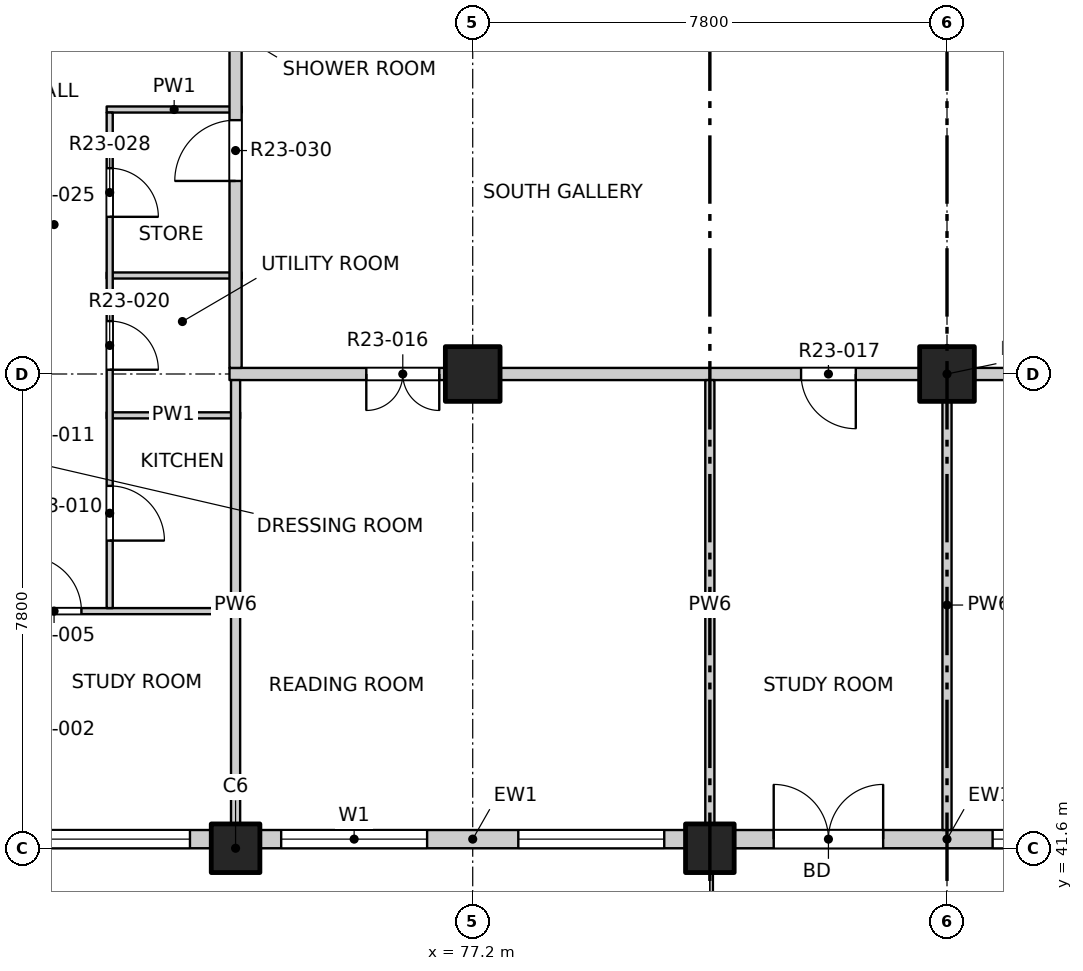
"""IFC4 building model, lengths in metres.
Left out: names, types, materials, properties, quantities, classifications, styles, units other than length and angle.
Written with IfcOpenShell. Run it as: python <this file> out.ifc"""

import sys

from ifc_helpers import new_model, si_unit, direction, frame, frame_2d, origin, origin_2d, place, context, subcontext, project, spatial, rectangle, extrude, element, fill, save


model = new_model("IFC4")
c1 = context("Model", 3, precision=1e-05, world=origin(), true_north=direction((0.0, 1.0)))
c2 = subcontext(c1, "Body", "Model", "MODEL_VIEW")
j1 = project(units=[si_unit("LENGTHUNIT", "METRE"), si_unit("PLANEANGLEUNIT", "RADIAN")], contexts=[c1])
p1 = place(None, origin())
s1 = spatial("IfcSite", under=j1, at=p1, CompositionType="ELEMENT")
p2 = place(p1, origin())
s2 = spatial("IfcBuilding", under=s1, at=p2, CompositionType="ELEMENT")
p3 = place(p2, frame((0.0, 0.0, 234.7)))
s3 = spatial("IfcBuildingStorey", under=s2, at=p3, CompositionType="ELEMENT", Elevation=234.7)
for number, where, z_axis, x_axis in (
    (1, (73.3, 41.6, -0.25), (0.0, 0.0, 1.0), (1.0, 0.0, 0.0)),
    (2, (81.1, 41.6, -0.25), (0.0, 0.0, 1.0), (1.0, 0.0, 0.0)),
):
    element("IfcColumn", number, at=place(p3, frame(where, z_axis=z_axis, x_axis=x_axis)), inside=s3, PredefinedType="COLUMN", context=c2, shape_type="SweptSolid", body=[
        extrude(rectangle(XDim=0.8, YDim=0.8, at=origin_2d()), origin(), (0.0, 0.0, 1.0), 3.4),
    ])
for number, where, z_axis, x_axis in (
    (3, (77.2, 49.4, -0.25), (0.0, 0.0, 1.0), (1.0, 0.0, 0.0)),
    (4, (85.0, 49.4, -0.25), (0.0, 0.0, 1.0), (1.0, 0.0, 0.0)),
):
    element("IfcColumn", number, at=place(p3, frame(where, z_axis=z_axis, x_axis=x_axis)), inside=s3, PredefinedType="COLUMN", context=c2, shape_type="SweptSolid", body=[
        extrude(rectangle(XDim=0.9, YDim=0.9, at=origin_2d()), origin(), (0.0, 0.0, 1.0), 3.4),
    ])
p4 = place(p3, frame((65.5, 41.75, 0.0), z_axis=(0.0, 0.0, 1.0), x_axis=(1.0, 0.0, 0.0)))
e5 = element("IfcWall", 5, at=p4, inside=s3, PredefinedType="SOLIDWALL", context=c2, shape_type="SweptSolid", body=[
    extrude(rectangle(XDim=7.4, YDim=0.3, at=frame_2d((3.7, 0.0))), origin(), (0.0, 0.0, 1.0), 2.7),
])
p5 = place(p4, frame((0.75, 0.0, 0.9)))
e6 = element("IfcOpeningElement", 6, at=p5, cuts=e5, PredefinedType="OPENING", context=c2, shape_type="SweptSolid", body=[
    extrude(rectangle(XDim=2.4, YDim=1.8, at=frame_2d((1.2, 0.9))), frame((0.0, 0.16, 0.0), z_axis=(0.0, -1.0, 0.0), x_axis=(1.0, 0.0, 0.0)), (0.0, 0.0, 1.0), 0.32),
])
p6 = place(p4, frame((4.65, 0.0, 0.9)))
e7 = element("IfcOpeningElement", 7, at=p6, cuts=e5, PredefinedType="OPENING", context=c2, shape_type="SweptSolid", body=[
    extrude(rectangle(XDim=2.4, YDim=1.8, at=frame_2d((1.2, 0.9))), frame((0.0, 0.16, 0.0), z_axis=(0.0, -1.0, 0.0), x_axis=(1.0, 0.0, 0.0)), (0.0, 0.0, 1.0), 0.32),
])
p7 = place(p3, frame((73.7, 41.75, 0.0), z_axis=(0.0, 0.0, 1.0), x_axis=(1.0, 0.0, 0.0)))
e8 = element("IfcWall", 8, at=p7, inside=s3, PredefinedType="SOLIDWALL", context=c2, shape_type="SweptSolid", body=[
    extrude(rectangle(XDim=7.0, YDim=0.3, at=frame_2d((3.5, 0.0))), origin(), (0.0, 0.0, 1.0), 2.7),
])
p8 = place(p7, frame((0.35, 0.0, 0.9)))
e9 = element("IfcOpeningElement", 9, at=p8, cuts=e8, PredefinedType="OPENING", context=c2, shape_type="SweptSolid", body=[
    extrude(rectangle(XDim=2.4, YDim=1.8, at=frame_2d((1.2, 0.9))), frame((0.0, 0.16, 0.0), z_axis=(0.0, -1.0, 0.0), x_axis=(1.0, 0.0, 0.0)), (0.0, 0.0, 1.0), 0.32),
])
p9 = place(p7, frame((4.25, 0.0, 0.9)))
e10 = element("IfcOpeningElement", 10, at=p9, cuts=e8, PredefinedType="OPENING", context=c2, shape_type="SweptSolid", body=[
    extrude(rectangle(XDim=2.4, YDim=1.8, at=frame_2d((1.2, 0.9))), frame((0.0, 0.16, 0.0), z_axis=(0.0, -1.0, 0.0), x_axis=(1.0, 0.0, 0.0)), (0.0, 0.0, 1.0), 0.32),
])
p10 = place(p3, frame((81.5, 41.75, 0.0), z_axis=(0.0, 0.0, 1.0), x_axis=(1.0, 0.0, 0.0)))
e11 = element("IfcWall", 11, at=p10, inside=s3, PredefinedType="SOLIDWALL", context=c2, shape_type="SweptSolid", body=[
    extrude(rectangle(XDim=7.0, YDim=0.3, at=frame_2d((3.5, 0.0))), origin(), (0.0, 0.0, 1.0), 2.7),
])
p11 = place(p10, frame((0.65, 0.0, 0.0)))
e12 = element("IfcOpeningElement", 12, at=p11, cuts=e11, PredefinedType="OPENING", context=c2, shape_type="SweptSolid", body=[
    extrude(rectangle(XDim=1.8, YDim=2.4, at=frame_2d((0.9, 1.2))), frame((0.0, 0.16, 0.0), z_axis=(0.0, -1.0, 0.0), x_axis=(1.0, 0.0, 0.0)), (0.0, 0.0, 1.0), 0.32),
])
p12 = place(p10, frame((4.25, 0.0, 0.9)))
e13 = element("IfcOpeningElement", 13, at=p12, cuts=e11, PredefinedType="OPENING", context=c2, shape_type="SweptSolid", body=[
    extrude(rectangle(XDim=2.4, YDim=1.8, at=frame_2d((1.2, 0.9))), frame((0.0, 0.16, 0.0), z_axis=(0.0, -1.0, 0.0), x_axis=(1.0, 0.0, 0.0)), (0.0, 0.0, 1.0), 0.32),
])
p13 = place(p3, frame((61.9, 45.5, 0.0), z_axis=(0.0, 0.0, 1.0), x_axis=(1.0, 0.0, 0.0)))
e14 = element("IfcWall", 14, at=p13, inside=s3, PredefinedType="PARTITIONING", context=c2, shape_type="SweptSolid", body=[
    extrude(rectangle(XDim=11.475, YDim=0.1, at=frame_2d((5.737, 0.0))), origin(), (0.0, 0.0, 1.0), 3.15),
])
p14 = place(p13, frame((7.965, 0.0, 0.0)))
e15 = element("IfcOpeningElement", 15, at=p14, cuts=e14, PredefinedType="OPENING", context=c2, shape_type="SweptSolid", body=[
    extrude(rectangle(XDim=0.9, YDim=2.1, at=frame_2d((0.45, 1.05))), frame((0.0, 0.06, 0.0), z_axis=(0.0, -1.0, 0.0), x_axis=(1.0, 0.0, 0.0)), (0.0, 0.0, 1.0), 0.12),
])
p15 = place(p3, frame((71.18, 48.72, 0.0), z_axis=(0.0, 0.0, 1.0), x_axis=(1.0, 0.0, 0.0)))
e16 = element("IfcWall", 16, at=p15, inside=s3, PredefinedType="PARTITIONING", context=c2, shape_type="SweptSolid", body=[
    extrude(rectangle(XDim=2.195, YDim=0.1, at=frame_2d((1.097, 0.0))), origin(), (0.0, 0.0, 1.0), 3.15),
])
p16 = place(p3, frame((73.2, 49.4, 0.0), z_axis=(0.0, 0.0, 1.0), x_axis=(1.0, 0.0, 0.0)))
e17 = element("IfcWall", 17, at=p16, inside=s3, PredefinedType="PARTITIONING", context=c2, shape_type="SweptSolid", body=[
    extrude(rectangle(XDim=23.6, YDim=0.2, at=frame_2d((11.8, 0.0))), origin(), (0.0, 0.0, 1.0), 3.15),
])
p17 = place(p16, frame((2.25, 0.0, 0.0)))
e18 = element("IfcOpeningElement", 18, at=p17, cuts=e17, PredefinedType="OPENING", context=c2, shape_type="SweptSolid", body=[
    extrude(rectangle(XDim=1.2, YDim=2.1, at=frame_2d((0.6, 1.05))), frame((0.0, 0.11, 0.0), z_axis=(0.0, -1.0, 0.0), x_axis=(1.0, 0.0, 0.0)), (0.0, 0.0, 1.0), 0.22),
])
p18 = place(p16, frame((9.4, 0.0, 0.0)))
e19 = element("IfcOpeningElement", 19, at=p18, cuts=e17, PredefinedType="OPENING", context=c2, shape_type="SweptSolid", body=[
    extrude(rectangle(XDim=0.9, YDim=2.1, at=frame_2d((0.45, 1.05))), frame((0.0, 0.11, 0.0), z_axis=(0.0, -1.0, 0.0), x_axis=(1.0, 0.0, 0.0)), (0.0, 0.0, 1.0), 0.22),
])
p19 = place(p16, frame((15.1, 0.0, 0.0)))
e20 = element("IfcOpeningElement", 20, at=p19, cuts=e17, PredefinedType="OPENING", context=c2, shape_type="SweptSolid", body=[
    extrude(rectangle(XDim=1.2, YDim=2.1, at=frame_2d((0.6, 1.05))), frame((0.0, 0.11, 0.0), z_axis=(0.0, -1.0, 0.0), x_axis=(1.0, 0.0, 0.0)), (0.0, 0.0, 1.0), 0.22),
])
p20 = place(p16, frame((21.1, 0.0, 0.0)))
e21 = element("IfcOpeningElement", 21, at=p20, cuts=e17, PredefinedType="OPENING", context=c2, shape_type="SweptSolid", body=[
    extrude(rectangle(XDim=0.9, YDim=2.1, at=frame_2d((0.45, 1.05))), frame((0.0, 0.11, 0.0), z_axis=(0.0, -1.0, 0.0), x_axis=(1.0, 0.0, 0.0)), (0.0, 0.0, 1.0), 0.22),
])
for number, where, z_axis, x_axis in (
    (22, (71.18, 51.02, 0.0), (0.0, 0.0, 1.0), (1.0, 0.0, 0.0)),
    (23, (71.18, 53.75, 0.0), (0.0, 0.0, 1.0), (1.0, 0.0, 0.0)),
):
    element("IfcWall", number, at=place(p3, frame(where, z_axis=z_axis, x_axis=x_axis)), inside=s3, PredefinedType="PARTITIONING", context=c2, shape_type="SweptSolid", body=[
        extrude(rectangle(XDim=2.22, YDim=0.1, at=frame_2d((1.11, 0.0))), origin(), (0.0, 0.0, 1.0), 3.15),
    ])
p21 = place(p3, frame((71.23, 45.55, 0.0), z_axis=(0.0, 0.0, 1.0), x_axis=(0.0, 1.0, 0.0)))
e24 = element("IfcWall", 24, at=p21, inside=s3, PredefinedType="PARTITIONING", context=c2, shape_type="SweptSolid", body=[
    extrude(rectangle(XDim=8.15, YDim=0.1, at=frame_2d((4.075, 0.0))), origin(), (0.0, 0.0, 1.0), 3.15),
])
p22 = place(p21, frame((1.11, 0.0, 0.0)))
e25 = element("IfcOpeningElement", 25, at=p22, cuts=e24, PredefinedType="OPENING", context=c2, shape_type="SweptSolid", body=[
    extrude(rectangle(XDim=0.9, YDim=2.1, at=frame_2d((0.45, 1.05))), frame((0.0, 0.06, 0.0), z_axis=(0.0, -1.0, 0.0), x_axis=(1.0, 0.0, 0.0)), (0.0, 0.0, 1.0), 0.12),
])
p23 = place(p21, frame((3.92, 0.0, 0.0)))
e26 = element("IfcOpeningElement", 26, at=p23, cuts=e24, PredefinedType="OPENING", context=c2, shape_type="SweptSolid", body=[
    extrude(rectangle(XDim=0.8, YDim=2.1, at=frame_2d((0.4, 1.05))), frame((0.0, 0.06, 0.0), z_axis=(0.0, -1.0, 0.0), x_axis=(1.0, 0.0, 0.0)), (0.0, 0.0, 1.0), 0.12),
])
p24 = place(p21, frame((6.435, 0.0, 0.0)))
e27 = element("IfcOpeningElement", 27, at=p24, cuts=e24, PredefinedType="OPENING", context=c2, shape_type="SweptSolid", body=[
    extrude(rectangle(XDim=0.8, YDim=2.1, at=frame_2d((0.4, 1.05))), frame((0.0, 0.06, 0.0), z_axis=(0.0, -1.0, 0.0), x_axis=(1.0, 0.0, 0.0)), (0.0, 0.0, 1.0), 0.12),
])
p25 = place(p3, frame((73.3, 41.9, 0.0), z_axis=(0.0, 0.0, 1.0), x_axis=(0.0, 1.0, 0.0)))
e28 = element("IfcWall", 28, at=p25, inside=s3, PredefinedType="PARTITIONING", context=c2, shape_type="SweptSolid", body=[
    extrude(rectangle(XDim=7.4, YDim=0.15, at=frame_2d((3.7, 0.0))), origin(), (0.0, 0.0, 1.0), 3.15),
])
p26 = place(p3, frame((73.3, 49.5, 0.0), z_axis=(0.0, 0.0, 1.0), x_axis=(0.0, 1.0, 0.0)))
e29 = element("IfcWall", 29, at=p26, inside=s3, PredefinedType="PARTITIONING", context=c2, shape_type="SweptSolid", body=[
    extrude(rectangle(XDim=34.9, YDim=0.2, at=frame_2d((17.45, 0.0))), origin(), (0.0, 0.0, 1.0), 3.15),
])
p27 = place(p26, frame((3.075, 0.0, 0.0)))
e30 = element("IfcOpeningElement", 30, at=p27, cuts=e29, PredefinedType="OPENING", context=c2, shape_type="SweptSolid", body=[
    extrude(rectangle(XDim=1.0, YDim=2.1, at=frame_2d((0.5, 1.05))), frame((0.0, 0.11, 0.0), z_axis=(0.0, -1.0, 0.0), x_axis=(1.0, 0.0, 0.0)), (0.0, 0.0, 1.0), 0.22),
])
p28 = place(p26, frame((14.575, 0.0, 0.0)))
e31 = element("IfcOpeningElement", 31, at=p28, cuts=e29, PredefinedType="OPENING", context=c2, shape_type="SweptSolid", body=[
    extrude(rectangle(XDim=1.0, YDim=2.1, at=frame_2d((0.5, 1.05))), frame((0.0, 0.11, 0.0), z_axis=(0.0, -1.0, 0.0), x_axis=(1.0, 0.0, 0.0)), (0.0, 0.0, 1.0), 0.22),
])
p29 = place(p26, frame((33.625, 0.0, 0.0)))
e32 = element("IfcOpeningElement", 32, at=p29, cuts=e29, PredefinedType="OPENING", context=c2, shape_type="SweptSolid", body=[
    extrude(rectangle(XDim=1.0, YDim=2.1, at=frame_2d((0.5, 1.05))), frame((0.0, 0.11, 0.0), z_axis=(0.0, -1.0, 0.0), x_axis=(1.0, 0.0, 0.0)), (0.0, 0.0, 1.0), 0.22),
])
p30 = place(p3, frame((81.1, 41.9, 0.0), z_axis=(0.0, 0.0, 1.0), x_axis=(0.0, 1.0, 0.0)))
e33 = element("IfcWall", 33, at=p30, inside=s3, PredefinedType="PARTITIONING", context=c2, shape_type="SweptSolid", body=[
    extrude(rectangle(XDim=7.4, YDim=0.15, at=frame_2d((3.7, 0.0))), origin(), (0.0, 0.0, 1.0), 2.55),
])
p31 = place(p3, frame((85.0, 41.9, 0.0), z_axis=(0.0, 0.0, 1.0), x_axis=(0.0, 1.0, 0.0)))
e34 = element("IfcWall", 34, at=p31, inside=s3, PredefinedType="PARTITIONING", context=c2, shape_type="SweptSolid", body=[
    extrude(rectangle(XDim=7.4, YDim=0.15, at=frame_2d((3.7, 0.0))), origin(), (0.0, 0.0, 1.0), 3.15),
])
p32 = place(p6, origin())
e35 = element("IfcWindow", 35, at=p32, inside=s3, PartitioningType="DOUBLE_PANEL_VERTICAL", PredefinedType="WINDOW", context=c2, shape_type="SweptSolid", body=[
    extrude(rectangle(XDim=2.4, YDim=1.8, at=frame_2d((1.2, 0.9))), frame((0.0, 0.03, 0.0), z_axis=(0.0, -1.0, 0.0), x_axis=(1.0, 0.0, 0.0)), (0.0, 0.0, 1.0), 0.06),
])
fill(e7, e35)
p33 = place(p8, origin())
e36 = element("IfcWindow", 36, at=p33, inside=s3, PartitioningType="DOUBLE_PANEL_VERTICAL", PredefinedType="WINDOW", context=c2, shape_type="SweptSolid", body=[
    extrude(rectangle(XDim=2.4, YDim=1.8, at=frame_2d((1.2, 0.9))), frame((0.0, 0.03, 0.0), z_axis=(0.0, -1.0, 0.0), x_axis=(1.0, 0.0, 0.0)), (0.0, 0.0, 1.0), 0.06),
])
fill(e9, e36)
p34 = place(p9, origin())
e37 = element("IfcWindow", 37, at=p34, inside=s3, PartitioningType="DOUBLE_PANEL_VERTICAL", PredefinedType="WINDOW", context=c2, shape_type="SweptSolid", body=[
    extrude(rectangle(XDim=2.4, YDim=1.8, at=frame_2d((1.2, 0.9))), frame((0.0, 0.03, 0.0), z_axis=(0.0, -1.0, 0.0), x_axis=(1.0, 0.0, 0.0)), (0.0, 0.0, 1.0), 0.06),
])
fill(e10, e37)
p35 = place(p11, origin())
e38 = element("IfcDoor", 38, at=p35, inside=s3, OperationType="DOUBLE_DOOR_SINGLE_SWING", PredefinedType="DOOR", context=c2, shape_type="SweptSolid", body=[
    extrude(rectangle(XDim=1.8, YDim=2.4, at=frame_2d((0.9, 1.2))), frame((0.0, 0.025, 0.0), z_axis=(0.0, -1.0, 0.0), x_axis=(1.0, 0.0, 0.0)), (0.0, 0.0, 1.0), 0.05),
])
fill(e12, e38)
p36 = place(p12, origin())
e39 = element("IfcWindow", 39, at=p36, inside=s3, PartitioningType="DOUBLE_PANEL_VERTICAL", PredefinedType="WINDOW", context=c2, shape_type="SweptSolid", body=[
    extrude(rectangle(XDim=2.4, YDim=1.8, at=frame_2d((1.2, 0.9))), frame((0.0, 0.03, 0.0), z_axis=(0.0, -1.0, 0.0), x_axis=(1.0, 0.0, 0.0)), (0.0, 0.0, 1.0), 0.06),
])
fill(e13, e39)
p37 = place(p14, origin())
e40 = element("IfcDoor", 40, at=p37, inside=s3, OperationType="SINGLE_SWING_LEFT", PredefinedType="DOOR", context=c2, shape_type="SweptSolid", body=[
    extrude(rectangle(XDim=0.9, YDim=2.1, at=frame_2d((0.45, 1.05))), frame((0.0, 0.025, 0.0), z_axis=(0.0, -1.0, 0.0), x_axis=(1.0, 0.0, 0.0)), (0.0, 0.0, 1.0), 0.05),
])
fill(e15, e40)
p38 = place(p22, origin())
e41 = element("IfcDoor", 41, at=p38, inside=s3, OperationType="SINGLE_SWING_RIGHT", PredefinedType="DOOR", context=c2, shape_type="SweptSolid", body=[
    extrude(rectangle(XDim=0.9, YDim=2.1, at=frame_2d((0.45, 1.05))), frame((0.0, 0.025, 0.0), z_axis=(0.0, -1.0, 0.0), x_axis=(1.0, 0.0, 0.0)), (0.0, 0.0, 1.0), 0.05),
])
fill(e25, e41)
p39 = place(p17, origin())
e42 = element("IfcDoor", 42, at=p39, inside=s3, OperationType="DOUBLE_DOOR_SINGLE_SWING", PredefinedType="DOOR", context=c2, shape_type="SweptSolid", body=[
    extrude(rectangle(XDim=1.2, YDim=2.1, at=frame_2d((0.6, 1.05))), frame((0.0, 0.025, 0.0), z_axis=(0.0, -1.0, 0.0), x_axis=(1.0, 0.0, 0.0)), (0.0, 0.0, 1.0), 0.05),
])
fill(e18, e42)
p40 = place(p18, origin())
e43 = element("IfcDoor", 43, at=p40, inside=s3, OperationType="SINGLE_SWING_LEFT", PredefinedType="DOOR", context=c2, shape_type="SweptSolid", body=[
    extrude(rectangle(XDim=0.9, YDim=2.1, at=frame_2d((0.45, 1.05))), frame((0.0, 0.025, 0.0), z_axis=(0.0, -1.0, 0.0), x_axis=(1.0, 0.0, 0.0)), (0.0, 0.0, 1.0), 0.05),
])
fill(e19, e43)
p41 = place(p23, origin())
e44 = element("IfcDoor", 44, at=p41, inside=s3, OperationType="SINGLE_SWING_RIGHT", PredefinedType="DOOR", context=c2, shape_type="SweptSolid", body=[
    extrude(rectangle(XDim=0.8, YDim=2.1, at=frame_2d((0.4, 1.05))), frame((0.0, 0.025, 0.0), z_axis=(0.0, -1.0, 0.0), x_axis=(1.0, 0.0, 0.0)), (0.0, 0.0, 1.0), 0.05),
])
fill(e26, e44)
p42 = place(p24, origin())
e45 = element("IfcDoor", 45, at=p42, inside=s3, OperationType="SINGLE_SWING_RIGHT", PredefinedType="DOOR", context=c2, shape_type="SweptSolid", body=[
    extrude(rectangle(XDim=0.8, YDim=2.1, at=frame_2d((0.4, 1.05))), frame((0.0, 0.025, 0.0), z_axis=(0.0, -1.0, 0.0), x_axis=(1.0, 0.0, 0.0)), (0.0, 0.0, 1.0), 0.05),
])
fill(e27, e45)
p43 = place(p27, origin())
e46 = element("IfcDoor", 46, at=p43, inside=s3, OperationType="SINGLE_SWING_LEFT", PredefinedType="DOOR", context=c2, shape_type="SweptSolid", body=[
    extrude(rectangle(XDim=1.0, YDim=2.1, at=frame_2d((0.5, 1.05))), frame((0.0, 0.025, 0.0), z_axis=(0.0, -1.0, 0.0), x_axis=(1.0, 0.0, 0.0)), (0.0, 0.0, 1.0), 0.05),
])
fill(e30, e46)
save(model, sys.argv[1])
